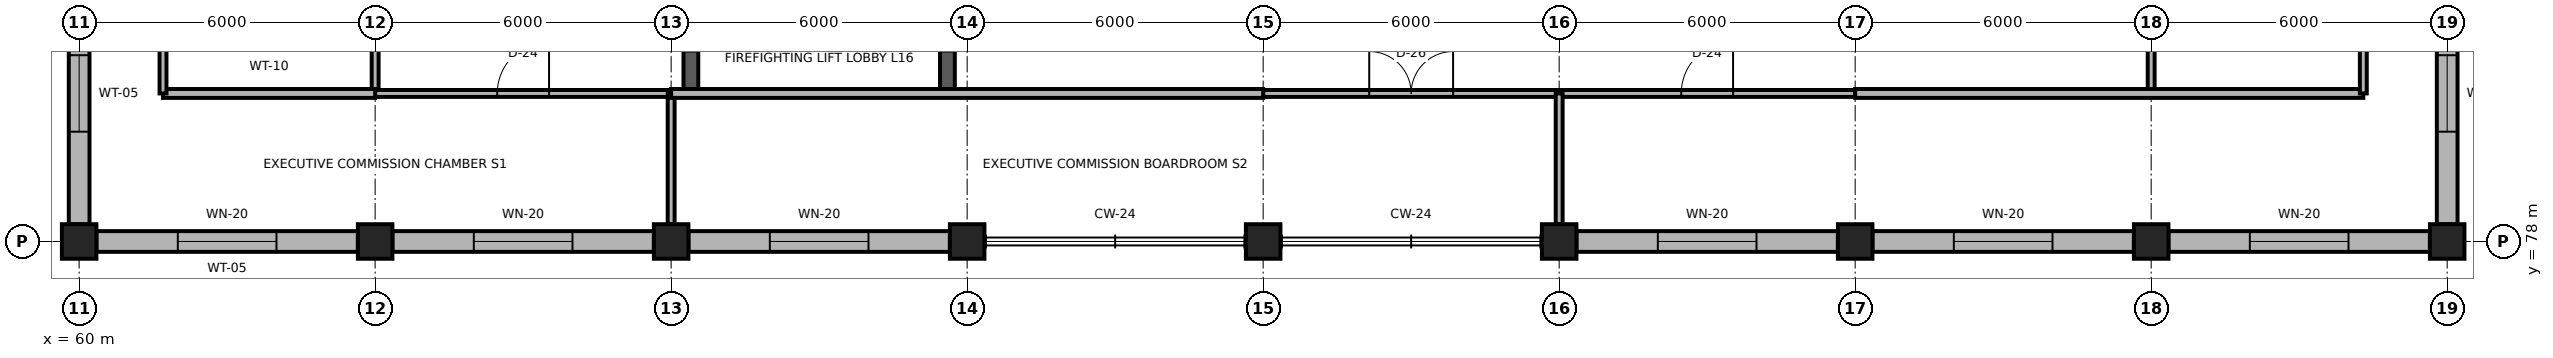
"""IFC4 building model, lengths in metres.
Left out: names, types, materials, properties, quantities, classifications, styles, units other than length and angle.
Written with IfcOpenShell. Run it as: python <this file> out.ifc"""

import sys

from ifc_helpers import new_model, si_unit, direction, frame, frame_2d, origin, origin_2d, place, context, subcontext, project, spatial, rectangle, extrude, element, fill, save


model = new_model("IFC4")
c1 = context("Model", 3, precision=1e-05, world=origin(), true_north=direction((0.0, 1.0)))
c2 = subcontext(c1, "Body", "Model", "MODEL_VIEW")
j1 = project(units=[si_unit("LENGTHUNIT", "METRE"), si_unit("PLANEANGLEUNIT", "RADIAN")], contexts=[c1])
p1 = place(None, origin())
s1 = spatial("IfcSite", under=j1, at=p1, CompositionType="ELEMENT")
p2 = place(p1, origin())
s2 = spatial("IfcBuilding", under=s1, at=p2, CompositionType="ELEMENT")
p3 = place(p2, frame((0.0, 0.0, 63.9)))
s3 = spatial("IfcBuildingStorey", under=s2, at=p3, CompositionType="ELEMENT", Elevation=63.9)
p4 = place(p3, frame((60.0, 78.0, 0.0), z_axis=(0.0, 0.0, 1.0), x_axis=(1.0, 0.0, 0.0)))
e1 = element("IfcColumn", 1, at=p4, inside=s3, PredefinedType="COLUMN", context=c2, shape_type="SweptSolid", body=[
    extrude(rectangle(XDim=0.7, YDim=0.7, at=origin_2d()), origin(), (0.0, 0.0, 1.0), 3.68),
])
for number, where, z_axis, x_axis in (
    (2, (66.0, 78.0, 0.0), (0.0, 0.0, 1.0), (1.0, 0.0, 0.0)),
    (3, (72.0, 78.0, 0.0), (0.0, 0.0, 1.0), (1.0, 0.0, 0.0)),
    (4, (78.0, 78.0, 0.0), (0.0, 0.0, 1.0), (1.0, 0.0, 0.0)),
    (5, (84.0, 78.0, 0.0), (0.0, 0.0, 1.0), (1.0, 0.0, 0.0)),
    (6, (90.0, 78.0, 0.0), (0.0, 0.0, 1.0), (1.0, 0.0, 0.0)),
    (7, (96.0, 78.0, 0.0), (0.0, 0.0, 1.0), (1.0, 0.0, 0.0)),
    (8, (102.0, 78.0, 0.0), (0.0, 0.0, 1.0), (1.0, 0.0, 0.0)),
):
    element("IfcColumn", number, at=place(p3, frame(where, z_axis=z_axis, x_axis=x_axis)), inside=s3, PredefinedType="COLUMN", context=c2, shape_type="SweptSolid", body=[
        extrude(rectangle(XDim=0.7, YDim=0.7, at=origin_2d()), origin(), (0.0, 0.0, 1.0), 3.9),
    ])
p5 = place(p3, frame((108.0, 78.0, 0.0), z_axis=(0.0, 0.0, 1.0), x_axis=(1.0, 0.0, 0.0)))
e9 = element("IfcColumn", 9, at=p5, inside=s3, PredefinedType="COLUMN", context=c2, shape_type="SweptSolid", body=[
    extrude(rectangle(XDim=0.7, YDim=0.7, at=origin_2d()), origin(), (0.0, 0.0, 1.0), 3.68),
])
p6 = place(p3, frame((60.35, 78.0, 0.0), z_axis=(0.0, 0.0, 1.0), x_axis=(1.0, 0.0, 0.0)))
e10 = element("IfcWall", 10, at=p6, inside=s3, PredefinedType="SOLIDWALL", context=c2, shape_type="SweptSolid", body=[
    extrude(rectangle(XDim=5.3, YDim=0.42, at=frame_2d((2.65, 0.0))), origin(), (0.0, 0.0, 1.0), 3.24),
])
p7 = place(p6, frame((1.65, 0.0, 0.85)))
e11 = element("IfcOpeningElement", 11, at=p7, cuts=e10, PredefinedType="OPENING", context=c2, shape_type="SweptSolid", body=[
    extrude(rectangle(XDim=2.0, YDim=1.95, at=frame_2d((1.0, 0.975))), frame((0.0, 0.225, 0.0), z_axis=(0.0, -1.0, 0.0), x_axis=(1.0, 0.0, 0.0)), (0.0, 0.0, 1.0), 0.45),
])
p8 = place(p3, frame((66.35, 78.0, 0.0), z_axis=(0.0, 0.0, 1.0), x_axis=(1.0, 0.0, 0.0)))
e12 = element("IfcWall", 12, at=p8, inside=s3, PredefinedType="SOLIDWALL", context=c2, shape_type="SweptSolid", body=[
    extrude(rectangle(XDim=5.3, YDim=0.42, at=frame_2d((2.65, 0.0))), origin(), (0.0, 0.0, 1.0), 3.24),
])
p9 = place(p8, frame((1.65, 0.0, 0.85)))
e13 = element("IfcOpeningElement", 13, at=p9, cuts=e12, PredefinedType="OPENING", context=c2, shape_type="SweptSolid", body=[
    extrude(rectangle(XDim=2.0, YDim=1.95, at=frame_2d((1.0, 0.975))), frame((0.0, 0.225, 0.0), z_axis=(0.0, -1.0, 0.0), x_axis=(1.0, 0.0, 0.0)), (0.0, 0.0, 1.0), 0.45),
])
p10 = place(p3, frame((72.35, 78.0, 0.0), z_axis=(0.0, 0.0, 1.0), x_axis=(1.0, 0.0, 0.0)))
e14 = element("IfcWall", 14, at=p10, inside=s3, PredefinedType="SOLIDWALL", context=c2, shape_type="SweptSolid", body=[
    extrude(rectangle(XDim=5.3, YDim=0.42, at=frame_2d((2.65, 0.0))), origin(), (0.0, 0.0, 1.0), 3.24),
])
p11 = place(p10, frame((1.65, 0.0, 0.85)))
e15 = element("IfcOpeningElement", 15, at=p11, cuts=e14, PredefinedType="OPENING", context=c2, shape_type="SweptSolid", body=[
    extrude(rectangle(XDim=2.0, YDim=1.95, at=frame_2d((1.0, 0.975))), frame((0.0, 0.225, 0.0), z_axis=(0.0, -1.0, 0.0), x_axis=(1.0, 0.0, 0.0)), (0.0, 0.0, 1.0), 0.45),
])
p12 = place(p3, frame((90.35, 78.0, 0.0), z_axis=(0.0, 0.0, 1.0), x_axis=(1.0, 0.0, 0.0)))
e16 = element("IfcWall", 16, at=p12, inside=s3, PredefinedType="SOLIDWALL", context=c2, shape_type="SweptSolid", body=[
    extrude(rectangle(XDim=5.3, YDim=0.42, at=frame_2d((2.65, 0.0))), origin(), (0.0, 0.0, 1.0), 3.24),
])
p13 = place(p12, frame((1.65, 0.0, 0.85)))
e17 = element("IfcOpeningElement", 17, at=p13, cuts=e16, PredefinedType="OPENING", context=c2, shape_type="SweptSolid", body=[
    extrude(rectangle(XDim=2.0, YDim=1.95, at=frame_2d((1.0, 0.975))), frame((0.0, 0.225, 0.0), z_axis=(0.0, -1.0, 0.0), x_axis=(1.0, 0.0, 0.0)), (0.0, 0.0, 1.0), 0.45),
])
p14 = place(p3, frame((96.35, 78.0, 0.0), z_axis=(0.0, 0.0, 1.0), x_axis=(1.0, 0.0, 0.0)))
e18 = element("IfcWall", 18, at=p14, inside=s3, PredefinedType="SOLIDWALL", context=c2, shape_type="SweptSolid", body=[
    extrude(rectangle(XDim=5.3, YDim=0.42, at=frame_2d((2.65, 0.0))), origin(), (0.0, 0.0, 1.0), 3.24),
])
p15 = place(p14, frame((1.65, 0.0, 0.85)))
e19 = element("IfcOpeningElement", 19, at=p15, cuts=e18, PredefinedType="OPENING", context=c2, shape_type="SweptSolid", body=[
    extrude(rectangle(XDim=2.0, YDim=1.95, at=frame_2d((1.0, 0.975))), frame((0.0, 0.225, 0.0), z_axis=(0.0, -1.0, 0.0), x_axis=(1.0, 0.0, 0.0)), (0.0, 0.0, 1.0), 0.45),
])
p16 = place(p3, frame((102.35, 78.0, 0.0), z_axis=(0.0, 0.0, 1.0), x_axis=(1.0, 0.0, 0.0)))
e20 = element("IfcWall", 20, at=p16, inside=s3, PredefinedType="SOLIDWALL", context=c2, shape_type="SweptSolid", body=[
    extrude(rectangle(XDim=5.3, YDim=0.42, at=frame_2d((2.65, 0.0))), origin(), (0.0, 0.0, 1.0), 3.24),
])
p17 = place(p16, frame((1.65, 0.0, 0.85)))
e21 = element("IfcOpeningElement", 21, at=p17, cuts=e20, PredefinedType="OPENING", context=c2, shape_type="SweptSolid", body=[
    extrude(rectangle(XDim=2.0, YDim=1.95, at=frame_2d((1.0, 0.975))), frame((0.0, 0.225, 0.0), z_axis=(0.0, -1.0, 0.0), x_axis=(1.0, 0.0, 0.0)), (0.0, 0.0, 1.0), 0.45),
])
p18 = place(p3, frame((60.0, 78.35, 0.0), z_axis=(0.0, 0.0, 1.0), x_axis=(0.0, 1.0, 0.0)))
e22 = element("IfcWall", 22, at=p18, inside=s3, PredefinedType="SOLIDWALL", context=c2, shape_type="SweptSolid", body=[
    extrude(rectangle(XDim=5.3, YDim=0.42, at=frame_2d((2.65, 0.0))), origin(), (0.0, 0.0, 1.0), 3.24),
])
p19 = place(p18, frame((1.875, 0.0, 0.85)))
e23 = element("IfcOpeningElement", 23, at=p19, cuts=e22, PredefinedType="OPENING", context=c2, shape_type="SweptSolid", body=[
    extrude(rectangle(XDim=1.55, YDim=1.9, at=frame_2d((0.775, 0.95))), frame((0.0, 0.225, 0.0), z_axis=(0.0, -1.0, 0.0), x_axis=(1.0, 0.0, 0.0)), (0.0, 0.0, 1.0), 0.45),
])
p20 = place(p3, frame((108.0, 78.35, 0.0), z_axis=(0.0, 0.0, 1.0), x_axis=(0.0, 1.0, 0.0)))
e24 = element("IfcWall", 24, at=p20, inside=s3, PredefinedType="SOLIDWALL", context=c2, shape_type="SweptSolid", body=[
    extrude(rectangle(XDim=5.3, YDim=0.42, at=frame_2d((2.65, 0.0))), origin(), (0.0, 0.0, 1.0), 3.24),
])
p21 = place(p20, frame((1.875, 0.0, 0.85)))
e25 = element("IfcOpeningElement", 25, at=p21, cuts=e24, PredefinedType="OPENING", context=c2, shape_type="SweptSolid", body=[
    extrude(rectangle(XDim=1.55, YDim=1.9, at=frame_2d((0.775, 0.95))), frame((0.0, 0.225, 0.0), z_axis=(0.0, -1.0, 0.0), x_axis=(1.0, 0.0, 0.0)), (0.0, 0.0, 1.0), 0.45),
])
p22 = place(p3, frame((72.4, 81.0, 0.0), z_axis=(0.0, 0.0, 1.0), x_axis=(0.0, 1.0, 0.0)))
e26 = element("IfcWall", 26, at=p22, inside=s3, PredefinedType="SHEAR", context=c2, shape_type="SweptSolid", body=[
    extrude(rectangle(XDim=3.0, YDim=0.3, at=frame_2d((1.5, 0.0))), origin(), (0.0, 0.0, 1.0), 3.66),
])
p23 = place(p22, frame((0.85, 0.0, 0.0)))
e27 = element("IfcOpeningElement", 27, at=p23, cuts=e26, PredefinedType="OPENING", context=c2, shape_type="SweptSolid", body=[
    extrude(rectangle(XDim=1.3, YDim=2.2, at=frame_2d((0.65, 1.1))), frame((0.0, 0.165, 0.0), z_axis=(0.0, -1.0, 0.0), x_axis=(1.0, 0.0, 0.0)), (0.0, 0.0, 1.0), 0.33),
])
p24 = place(p3, frame((77.6, 81.0, 0.0), z_axis=(0.0, 0.0, 1.0), x_axis=(0.0, 1.0, 0.0)))
e28 = element("IfcWall", 28, at=p24, inside=s3, PredefinedType="SHEAR", context=c2, shape_type="SweptSolid", body=[
    extrude(rectangle(XDim=3.0, YDim=0.3, at=frame_2d((1.5, 0.0))), origin(), (0.0, 0.0, 1.0), 3.66),
])
p25 = place(p24, frame((0.85, 0.0, 0.0)))
e29 = element("IfcOpeningElement", 29, at=p25, cuts=e28, PredefinedType="OPENING", context=c2, shape_type="SweptSolid", body=[
    extrude(rectangle(XDim=1.3, YDim=2.2, at=frame_2d((0.65, 1.1))), frame((0.0, 0.165, 0.0), z_axis=(0.0, -1.0, 0.0), x_axis=(1.0, 0.0, 0.0)), (0.0, 0.0, 1.0), 0.33),
])
p26 = place(p3, frame((66.0, 81.05, 0.0), z_axis=(0.0, 0.0, 1.0), x_axis=(0.0, 1.0, 0.0)))
e30 = element("IfcWall", 30, at=p26, inside=s3, PredefinedType="PARTITIONING", context=c2, shape_type="SweptSolid", body=[
    extrude(rectangle(XDim=2.9, YDim=0.14, at=frame_2d((1.45, 0.0))), origin(), (0.0, 0.0, 1.0), 3.369),
])
p27 = place(p26, frame((0.925, 0.0, 0.0)))
e31 = element("IfcOpeningElement", 31, at=p27, cuts=e30, PredefinedType="OPENING", context=c2, shape_type="SweptSolid", body=[
    extrude(rectangle(XDim=1.05, YDim=2.25, at=frame_2d((0.525, 1.125))), frame((0.0, 0.085, 0.0), z_axis=(0.0, -1.0, 0.0), x_axis=(1.0, 0.0, 0.0)), (0.0, 0.0, 1.0), 0.17),
])
p28 = place(p3, frame((102.0, 81.05, 0.0), z_axis=(0.0, 0.0, 1.0), x_axis=(0.0, 1.0, 0.0)))
e32 = element("IfcWall", 32, at=p28, inside=s3, PredefinedType="PARTITIONING", context=c2, shape_type="SweptSolid", body=[
    extrude(rectangle(XDim=2.9, YDim=0.14, at=frame_2d((1.45, 0.0))), origin(), (0.0, 0.0, 1.0), 3.369),
])
p29 = place(p28, frame((0.925, 0.0, 0.0)))
e33 = element("IfcOpeningElement", 33, at=p29, cuts=e32, PredefinedType="OPENING", context=c2, shape_type="SweptSolid", body=[
    extrude(rectangle(XDim=1.05, YDim=2.25, at=frame_2d((0.525, 1.125))), frame((0.0, 0.085, 0.0), z_axis=(0.0, -1.0, 0.0), x_axis=(1.0, 0.0, 0.0)), (0.0, 0.0, 1.0), 0.17),
])
p30 = place(p3, frame((66.0, 81.0, 0.0), z_axis=(0.0, 0.0, 1.0), x_axis=(1.0, 0.0, 0.0)))
e34 = element("IfcWall", 34, at=p30, inside=s3, PredefinedType="PARTITIONING", context=c2, shape_type="SweptSolid", body=[
    extrude(rectangle(XDim=6.0, YDim=0.14, at=frame_2d((3.0, 0.0))), origin(), (0.0, 0.0, 1.0), 3.66),
])
p31 = place(p30, frame((2.475, 0.0, 0.0)))
e35 = element("IfcOpeningElement", 35, at=p31, cuts=e34, PredefinedType="OPENING", context=c2, shape_type="SweptSolid", body=[
    extrude(rectangle(XDim=1.05, YDim=2.25, at=frame_2d((0.525, 1.125))), frame((0.0, 0.085, 0.0), z_axis=(0.0, -1.0, 0.0), x_axis=(1.0, 0.0, 0.0)), (0.0, 0.0, 1.0), 0.17),
])
p32 = place(p3, frame((84.0, 81.0, 0.0), z_axis=(0.0, 0.0, 1.0), x_axis=(1.0, 0.0, 0.0)))
e36 = element("IfcWall", 36, at=p32, inside=s3, PredefinedType="PARTITIONING", context=c2, shape_type="SweptSolid", body=[
    extrude(rectangle(XDim=6.0, YDim=0.14, at=frame_2d((3.0, 0.0))), origin(), (0.0, 0.0, 1.0), 3.66),
])
p33 = place(p32, frame((2.15, 0.0, 0.0)))
e37 = element("IfcOpeningElement", 37, at=p33, cuts=e36, PredefinedType="OPENING", context=c2, shape_type="SweptSolid", body=[
    extrude(rectangle(XDim=1.7, YDim=2.45, at=frame_2d((0.85, 1.225))), frame((0.0, 0.085, 0.0), z_axis=(0.0, -1.0, 0.0), x_axis=(1.0, 0.0, 0.0)), (0.0, 0.0, 1.0), 0.17),
])
p34 = place(p3, frame((90.0, 81.0, 0.0), z_axis=(0.0, 0.0, 1.0), x_axis=(1.0, 0.0, 0.0)))
e38 = element("IfcWall", 38, at=p34, inside=s3, PredefinedType="PARTITIONING", context=c2, shape_type="SweptSolid", body=[
    extrude(rectangle(XDim=6.0, YDim=0.14, at=frame_2d((3.0, 0.0))), origin(), (0.0, 0.0, 1.0), 3.66),
])
p35 = place(p34, frame((2.475, 0.0, 0.0)))
e39 = element("IfcOpeningElement", 39, at=p35, cuts=e38, PredefinedType="OPENING", context=c2, shape_type="SweptSolid", body=[
    extrude(rectangle(XDim=1.05, YDim=2.25, at=frame_2d((0.525, 1.125))), frame((0.0, 0.085, 0.0), z_axis=(0.0, -1.0, 0.0), x_axis=(1.0, 0.0, 0.0)), (0.0, 0.0, 1.0), 0.17),
])
for number, where, z_axis, x_axis in (
    (40, (72.0, 78.35, 0.0), (0.0, 0.0, 1.0), (0.0, 1.0, 0.0)),
    (41, (90.0, 78.35, 0.0), (0.0, 0.0, 1.0), (0.0, 1.0, 0.0)),
):
    element("IfcWall", number, at=place(p3, frame(where, z_axis=z_axis, x_axis=x_axis)), inside=s3, PredefinedType="PARTITIONING", context=c2, shape_type="SweptSolid", body=[
        extrude(rectangle(XDim=2.65, YDim=0.14, at=frame_2d((1.325, 0.0))), origin(), (0.0, 0.0, 1.0), 3.369),
    ])
p36 = place(p3, frame((61.7, 81.0, 0.0), z_axis=(0.0, 0.0, 1.0), x_axis=(1.0, 0.0, 0.0)))
e42 = element("IfcWall", 42, at=p36, inside=s3, PredefinedType="PARTITIONING", context=c2, shape_type="SweptSolid", body=[
    extrude(rectangle(XDim=4.3, YDim=0.18, at=frame_2d((2.15, 0.0))), origin(), (0.0, 0.0, 1.0), 3.66),
])
p37 = place(p3, frame((72.0, 81.0, 0.0), z_axis=(0.0, 0.0, 1.0), x_axis=(1.0, 0.0, 0.0)))
e43 = element("IfcWall", 43, at=p37, inside=s3, PredefinedType="PARTITIONING", context=c2, shape_type="SweptSolid", body=[
    extrude(rectangle(XDim=12.0, YDim=0.18, at=frame_2d((6.0, 0.0))), origin(), (0.0, 0.0, 1.0), 3.66),
])
p38 = place(p3, frame((96.0, 81.0, 0.0), z_axis=(0.0, 0.0, 1.0), x_axis=(1.0, 0.0, 0.0)))
e44 = element("IfcWall", 44, at=p38, inside=s3, PredefinedType="PARTITIONING", context=c2, shape_type="SweptSolid", body=[
    extrude(rectangle(XDim=10.3, YDim=0.18, at=frame_2d((5.15, 0.0))), origin(), (0.0, 0.0, 1.0), 3.66),
])
for number, where, z_axis, x_axis in (
    (45, (61.7, 81.0, 0.0), (0.0, 0.0, 1.0), (0.0, 1.0, 0.0)),
    (46, (106.3, 81.0, 0.0), (0.0, 0.0, 1.0), (0.0, 1.0, 0.0)),
):
    element("IfcWall", number, at=place(p3, frame(where, z_axis=z_axis, x_axis=x_axis)), inside=s3, PredefinedType="PARTITIONING", context=c2, shape_type="SweptSolid", body=[
        extrude(rectangle(XDim=1.15, YDim=0.14, at=frame_2d((0.575, 0.0))), origin(), (0.0, 0.0, 1.0), 3.66),
    ])
p39 = place(p7, origin())
e47 = element("IfcWindow", 47, at=p39, inside=s3, PartitioningType="SINGLE_PANEL", PredefinedType="WINDOW", context=c2, shape_type="SweptSolid", body=[
    extrude(rectangle(XDim=2.0, YDim=1.95, at=frame_2d((1.0, 0.975))), frame((0.0, 0.03, 0.0), z_axis=(0.0, -1.0, 0.0), x_axis=(1.0, 0.0, 0.0)), (0.0, 0.0, 1.0), 0.06),
])
fill(e11, e47)
p40 = place(p9, origin())
e48 = element("IfcWindow", 48, at=p40, inside=s3, PartitioningType="SINGLE_PANEL", PredefinedType="WINDOW", context=c2, shape_type="SweptSolid", body=[
    extrude(rectangle(XDim=2.0, YDim=1.95, at=frame_2d((1.0, 0.975))), frame((0.0, 0.03, 0.0), z_axis=(0.0, -1.0, 0.0), x_axis=(1.0, 0.0, 0.0)), (0.0, 0.0, 1.0), 0.06),
])
fill(e13, e48)
p41 = place(p11, origin())
e49 = element("IfcWindow", 49, at=p41, inside=s3, PartitioningType="SINGLE_PANEL", PredefinedType="WINDOW", context=c2, shape_type="SweptSolid", body=[
    extrude(rectangle(XDim=2.0, YDim=1.95, at=frame_2d((1.0, 0.975))), frame((0.0, 0.03, 0.0), z_axis=(0.0, -1.0, 0.0), x_axis=(1.0, 0.0, 0.0)), (0.0, 0.0, 1.0), 0.06),
])
fill(e15, e49)
p42 = place(p13, origin())
e50 = element("IfcWindow", 50, at=p42, inside=s3, PartitioningType="SINGLE_PANEL", PredefinedType="WINDOW", context=c2, shape_type="SweptSolid", body=[
    extrude(rectangle(XDim=2.0, YDim=1.95, at=frame_2d((1.0, 0.975))), frame((0.0, 0.03, 0.0), z_axis=(0.0, -1.0, 0.0), x_axis=(1.0, 0.0, 0.0)), (0.0, 0.0, 1.0), 0.06),
])
fill(e17, e50)
p43 = place(p15, origin())
e51 = element("IfcWindow", 51, at=p43, inside=s3, PartitioningType="SINGLE_PANEL", PredefinedType="WINDOW", context=c2, shape_type="SweptSolid", body=[
    extrude(rectangle(XDim=2.0, YDim=1.95, at=frame_2d((1.0, 0.975))), frame((0.0, 0.03, 0.0), z_axis=(0.0, -1.0, 0.0), x_axis=(1.0, 0.0, 0.0)), (0.0, 0.0, 1.0), 0.06),
])
fill(e19, e51)
p44 = place(p17, origin())
e52 = element("IfcWindow", 52, at=p44, inside=s3, PartitioningType="SINGLE_PANEL", PredefinedType="WINDOW", context=c2, shape_type="SweptSolid", body=[
    extrude(rectangle(XDim=2.0, YDim=1.95, at=frame_2d((1.0, 0.975))), frame((0.0, 0.03, 0.0), z_axis=(0.0, -1.0, 0.0), x_axis=(1.0, 0.0, 0.0)), (0.0, 0.0, 1.0), 0.06),
])
fill(e21, e52)
p45 = place(p19, origin())
e53 = element("IfcWindow", 53, at=p45, inside=s3, PartitioningType="SINGLE_PANEL", PredefinedType="WINDOW", context=c2, shape_type="SweptSolid", body=[
    extrude(rectangle(XDim=1.55, YDim=1.9, at=frame_2d((0.775, 0.95))), frame((0.0, 0.03, 0.0), z_axis=(0.0, -1.0, 0.0), x_axis=(1.0, 0.0, 0.0)), (0.0, 0.0, 1.0), 0.06),
])
fill(e23, e53)
p46 = place(p21, origin())
e54 = element("IfcWindow", 54, at=p46, inside=s3, PartitioningType="SINGLE_PANEL", PredefinedType="WINDOW", context=c2, shape_type="SweptSolid", body=[
    extrude(rectangle(XDim=1.55, YDim=1.9, at=frame_2d((0.775, 0.95))), frame((0.0, 0.03, 0.0), z_axis=(0.0, -1.0, 0.0), x_axis=(1.0, 0.0, 0.0)), (0.0, 0.0, 1.0), 0.06),
])
fill(e25, e54)
p47 = place(p31, origin())
e55 = element("IfcDoor", 55, at=p47, inside=s3, OperationType="SINGLE_SWING_RIGHT", PredefinedType="DOOR", context=c2, shape_type="SweptSolid", body=[
    extrude(rectangle(XDim=1.05, YDim=2.25, at=frame_2d((0.525, 1.125))), frame((0.0, 0.025, 0.0), z_axis=(0.0, -1.0, 0.0), x_axis=(1.0, 0.0, 0.0)), (0.0, 0.0, 1.0), 0.05),
])
fill(e35, e55)
p48 = place(p33, origin())
e56 = element("IfcDoor", 56, at=p48, inside=s3, OperationType="DOUBLE_DOOR_SINGLE_SWING", PredefinedType="DOOR", context=c2, shape_type="SweptSolid", body=[
    extrude(rectangle(XDim=1.7, YDim=2.45, at=frame_2d((0.85, 1.225))), frame((0.0, 0.025, 0.0), z_axis=(0.0, -1.0, 0.0), x_axis=(1.0, 0.0, 0.0)), (0.0, 0.0, 1.0), 0.05),
])
fill(e37, e56)
p49 = place(p35, origin())
e57 = element("IfcDoor", 57, at=p49, inside=s3, OperationType="SINGLE_SWING_RIGHT", PredefinedType="DOOR", context=c2, shape_type="SweptSolid", body=[
    extrude(rectangle(XDim=1.05, YDim=2.25, at=frame_2d((0.525, 1.125))), frame((0.0, 0.025, 0.0), z_axis=(0.0, -1.0, 0.0), x_axis=(1.0, 0.0, 0.0)), (0.0, 0.0, 1.0), 0.05),
])
fill(e39, e57)
save(model, sys.argv[1])
